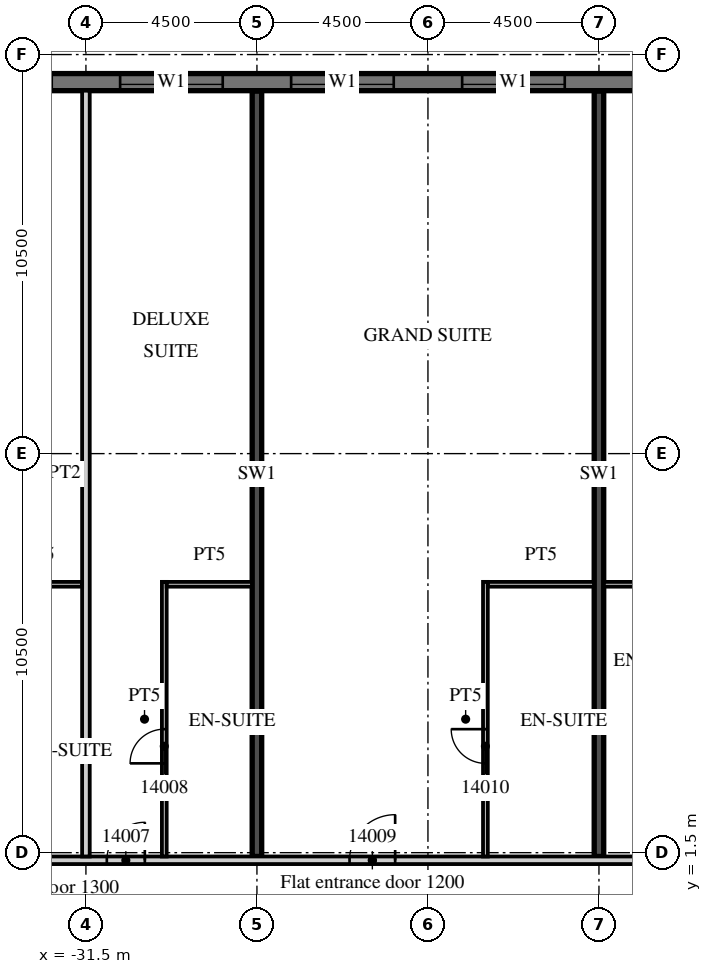
"""IFC4 building model, lengths in metres.
Left out: names, types, materials, properties, quantities, classifications, styles, units other than length and angle.
Written with IfcOpenShell. Run it as: python <this file> out.ifc"""

import sys

from ifc_helpers import new_model, si_unit, direction, frame, frame_2d, origin, place, context, subcontext, project, spatial, rectangle, extrude, element, fill, save


model = new_model("IFC4")
c1 = context("Model", 3, precision=1e-05, world=origin(), true_north=direction((0.0, 1.0)))
c2 = subcontext(c1, "Body", "Model", "MODEL_VIEW")
j1 = project(units=[si_unit("LENGTHUNIT", "METRE"), si_unit("PLANEANGLEUNIT", "RADIAN")], contexts=[c1])
p1 = place(None, origin())
s1 = spatial("IfcSite", under=j1, at=p1, CompositionType="ELEMENT")
p2 = place(p1, origin())
s2 = spatial("IfcBuilding", under=s1, at=p2, CompositionType="ELEMENT")
p3 = place(p2, frame((0.0, 0.0, 76.5)))
s3 = spatial("IfcBuildingStorey", under=s2, at=p3, CompositionType="ELEMENT", Elevation=76.5)
for number, where, z_axis, x_axis in (
    (1, (-27.0, 1.4, 0.0), (0.0, 0.0, 1.0), (0.0, 1.0, 0.0)),
    (2, (-18.0, 1.4, 0.0), (0.0, 0.0, 1.0), (0.0, 1.0, 0.0)),
):
    element("IfcWall", number, at=place(p3, frame(where, z_axis=z_axis, x_axis=x_axis)), inside=s3, PredefinedType="SHEAR", context=c2, shape_type="SweptSolid", body=[
        extrude(rectangle(XDim=20.14, YDim=0.25, at=frame_2d((10.07, 0.0))), origin(), (0.0, 0.0, 1.0), 3.3),
    ])
p4 = place(p3, frame((13.5, 21.775, 0.0), z_axis=(0.0, 0.0, 1.0), x_axis=(-1.0, 0.0, 0.0)))
e3 = element("IfcWall", 3, at=p4, inside=s3, PredefinedType="SOLIDWALL", context=c2, shape_type="SweptSolid", body=[
    extrude(rectangle(XDim=54.5, YDim=0.45, at=frame_2d((27.25, 0.0))), origin(), (0.0, 0.0, 1.0), 3.02),
])
p5 = place(p4, frame((0.9, 0.0, 0.45)))
e4 = element("IfcOpeningElement", 4, at=p5, cuts=e3, PredefinedType="OPENING", context=c2, shape_type="SweptSolid", body=[
    extrude(rectangle(XDim=2.7, YDim=2.25, at=frame_2d((1.35, 1.125))), frame((0.0, 0.235, 0.0), z_axis=(0.0, -1.0, 0.0), x_axis=(1.0, 0.0, 0.0)), (0.0, 0.0, 1.0), 0.47),
])
p6 = place(p4, frame((5.4, 0.0, 0.45)))
e5 = element("IfcOpeningElement", 5, at=p6, cuts=e3, PredefinedType="OPENING", context=c2, shape_type="SweptSolid", body=[
    extrude(rectangle(XDim=2.7, YDim=2.25, at=frame_2d((1.35, 1.125))), frame((0.0, 0.235, 0.0), z_axis=(0.0, -1.0, 0.0), x_axis=(1.0, 0.0, 0.0)), (0.0, 0.0, 1.0), 0.47),
])
p7 = place(p4, frame((9.9, 0.0, 0.45)))
e6 = element("IfcOpeningElement", 6, at=p7, cuts=e3, PredefinedType="OPENING", context=c2, shape_type="SweptSolid", body=[
    extrude(rectangle(XDim=2.7, YDim=2.25, at=frame_2d((1.35, 1.125))), frame((0.0, 0.235, 0.0), z_axis=(0.0, -1.0, 0.0), x_axis=(1.0, 0.0, 0.0)), (0.0, 0.0, 1.0), 0.47),
])
p8 = place(p4, frame((14.4, 0.0, 0.45)))
e7 = element("IfcOpeningElement", 7, at=p8, cuts=e3, PredefinedType="OPENING", context=c2, shape_type="SweptSolid", body=[
    extrude(rectangle(XDim=2.7, YDim=2.25, at=frame_2d((1.35, 1.125))), frame((0.0, 0.235, 0.0), z_axis=(0.0, -1.0, 0.0), x_axis=(1.0, 0.0, 0.0)), (0.0, 0.0, 1.0), 0.47),
])
p9 = place(p4, frame((18.9, 0.0, 0.45)))
e8 = element("IfcOpeningElement", 8, at=p9, cuts=e3, PredefinedType="OPENING", context=c2, shape_type="SweptSolid", body=[
    extrude(rectangle(XDim=2.7, YDim=2.25, at=frame_2d((1.35, 1.125))), frame((0.0, 0.235, 0.0), z_axis=(0.0, -1.0, 0.0), x_axis=(1.0, 0.0, 0.0)), (0.0, 0.0, 1.0), 0.47),
])
p10 = place(p4, frame((23.4, 0.0, 0.45)))
e9 = element("IfcOpeningElement", 9, at=p10, cuts=e3, PredefinedType="OPENING", context=c2, shape_type="SweptSolid", body=[
    extrude(rectangle(XDim=2.7, YDim=2.25, at=frame_2d((1.35, 1.125))), frame((0.0, 0.235, 0.0), z_axis=(0.0, -1.0, 0.0), x_axis=(1.0, 0.0, 0.0)), (0.0, 0.0, 1.0), 0.47),
])
p11 = place(p4, frame((27.9, 0.0, 0.45)))
e10 = element("IfcOpeningElement", 10, at=p11, cuts=e3, PredefinedType="OPENING", context=c2, shape_type="SweptSolid", body=[
    extrude(rectangle(XDim=2.7, YDim=2.25, at=frame_2d((1.35, 1.125))), frame((0.0, 0.235, 0.0), z_axis=(0.0, -1.0, 0.0), x_axis=(1.0, 0.0, 0.0)), (0.0, 0.0, 1.0), 0.47),
])
p12 = place(p4, frame((32.4, 0.0, 0.45)))
e11 = element("IfcOpeningElement", 11, at=p12, cuts=e3, PredefinedType="OPENING", context=c2, shape_type="SweptSolid", body=[
    extrude(rectangle(XDim=2.7, YDim=2.25, at=frame_2d((1.35, 1.125))), frame((0.0, 0.235, 0.0), z_axis=(0.0, -1.0, 0.0), x_axis=(1.0, 0.0, 0.0)), (0.0, 0.0, 1.0), 0.47),
])
p13 = place(p4, frame((36.9, 0.0, 0.45)))
e12 = element("IfcOpeningElement", 12, at=p13, cuts=e3, PredefinedType="OPENING", context=c2, shape_type="SweptSolid", body=[
    extrude(rectangle(XDim=2.7, YDim=2.25, at=frame_2d((1.35, 1.125))), frame((0.0, 0.235, 0.0), z_axis=(0.0, -1.0, 0.0), x_axis=(1.0, 0.0, 0.0)), (0.0, 0.0, 1.0), 0.47),
])
p14 = place(p4, frame((41.4, 0.0, 0.45)))
e13 = element("IfcOpeningElement", 13, at=p14, cuts=e3, PredefinedType="OPENING", context=c2, shape_type="SweptSolid", body=[
    extrude(rectangle(XDim=2.7, YDim=2.25, at=frame_2d((1.35, 1.125))), frame((0.0, 0.235, 0.0), z_axis=(0.0, -1.0, 0.0), x_axis=(1.0, 0.0, 0.0)), (0.0, 0.0, 1.0), 0.47),
])
p15 = place(p4, frame((45.9, 0.0, 0.45)))
e14 = element("IfcOpeningElement", 14, at=p15, cuts=e3, PredefinedType="OPENING", context=c2, shape_type="SweptSolid", body=[
    extrude(rectangle(XDim=2.7, YDim=2.25, at=frame_2d((1.35, 1.125))), frame((0.0, 0.235, 0.0), z_axis=(0.0, -1.0, 0.0), x_axis=(1.0, 0.0, 0.0)), (0.0, 0.0, 1.0), 0.47),
])
p16 = place(p4, frame((50.4, 0.0, 0.45)))
e15 = element("IfcOpeningElement", 15, at=p16, cuts=e3, PredefinedType="OPENING", context=c2, shape_type="SweptSolid", body=[
    extrude(rectangle(XDim=2.7, YDim=2.25, at=frame_2d((1.35, 1.125))), frame((0.0, 0.235, 0.0), z_axis=(0.0, -1.0, 0.0), x_axis=(1.0, 0.0, 0.0)), (0.0, 0.0, 1.0), 0.47),
])
p17 = place(p3, frame((-44.55, 1.3, 0.0), z_axis=(0.0, 0.0, 1.0), x_axis=(1.0, 0.0, 0.0)))
e16 = element("IfcWall", 16, at=p17, inside=s3, PredefinedType="PARTITIONING", context=c2, shape_type="SweptSolid", body=[
    extrude(rectangle(XDim=58.05, YDim=0.2, at=frame_2d((29.025, 0.0))), origin(), (0.0, 0.0, 1.0), 3.02),
])
p18 = place(p17, frame((0.525, 0.0, 0.0)))
e17 = element("IfcOpeningElement", 17, at=p18, cuts=e16, PredefinedType="OPENING", context=c2, shape_type="SweptSolid", body=[
    extrude(rectangle(XDim=1.0, YDim=2.1, at=frame_2d((0.5, 1.05))), frame((0.0, 0.11, 0.0), z_axis=(0.0, -1.0, 0.0), x_axis=(1.0, 0.0, 0.0)), (0.0, 0.0, 1.0), 0.22),
])
p19 = place(p17, frame((6.975, 0.0, 0.0)))
e18 = element("IfcOpeningElement", 18, at=p19, cuts=e16, PredefinedType="OPENING", context=c2, shape_type="SweptSolid", body=[
    extrude(rectangle(XDim=1.0, YDim=2.1, at=frame_2d((0.5, 1.05))), frame((0.0, 0.11, 0.0), z_axis=(0.0, -1.0, 0.0), x_axis=(1.0, 0.0, 0.0)), (0.0, 0.0, 1.0), 0.22),
])
p20 = place(p17, frame((9.125, 0.0, 0.0)))
e19 = element("IfcOpeningElement", 19, at=p20, cuts=e16, PredefinedType="OPENING", context=c2, shape_type="SweptSolid", body=[
    extrude(rectangle(XDim=1.0, YDim=2.1, at=frame_2d((0.5, 1.05))), frame((0.0, 0.11, 0.0), z_axis=(0.0, -1.0, 0.0), x_axis=(1.0, 0.0, 0.0)), (0.0, 0.0, 1.0), 0.22),
])
p21 = place(p17, frame((13.6, 0.0, 0.0)))
e20 = element("IfcOpeningElement", 20, at=p21, cuts=e16, PredefinedType="OPENING", context=c2, shape_type="SweptSolid", body=[
    extrude(rectangle(XDim=1.0, YDim=2.1, at=frame_2d((0.5, 1.05))), frame((0.0, 0.11, 0.0), z_axis=(0.0, -1.0, 0.0), x_axis=(1.0, 0.0, 0.0)), (0.0, 0.0, 1.0), 0.22),
])
p22 = place(p17, frame((19.987, 0.0, 0.0)))
e21 = element("IfcOpeningElement", 21, at=p22, cuts=e16, PredefinedType="OPENING", context=c2, shape_type="SweptSolid", body=[
    extrude(rectangle(XDim=1.2, YDim=2.1, at=frame_2d((0.6, 1.05))), frame((0.0, 0.11, 0.0), z_axis=(0.0, -1.0, 0.0), x_axis=(1.0, 0.0, 0.0)), (0.0, 0.0, 1.0), 0.22),
])
p23 = place(p17, frame((31.912, 0.0, 0.0)))
e22 = element("IfcOpeningElement", 22, at=p23, cuts=e16, PredefinedType="OPENING", context=c2, shape_type="SweptSolid", body=[
    extrude(rectangle(XDim=1.2, YDim=2.1, at=frame_2d((0.6, 1.05))), frame((0.0, 0.11, 0.0), z_axis=(0.0, -1.0, 0.0), x_axis=(1.0, 0.0, 0.0)), (0.0, 0.0, 1.0), 0.22),
])
p24 = place(p17, frame((38.5, 0.0, 0.0)))
e23 = element("IfcOpeningElement", 23, at=p24, cuts=e16, PredefinedType="OPENING", context=c2, shape_type="SweptSolid", body=[
    extrude(rectangle(XDim=1.0, YDim=2.1, at=frame_2d((0.5, 1.05))), frame((0.0, 0.11, 0.0), z_axis=(0.0, -1.0, 0.0), x_axis=(1.0, 0.0, 0.0)), (0.0, 0.0, 1.0), 0.22),
])
p25 = place(p17, frame((40.6, 0.0, 0.0)))
e24 = element("IfcOpeningElement", 24, at=p25, cuts=e16, PredefinedType="OPENING", context=c2, shape_type="SweptSolid", body=[
    extrude(rectangle(XDim=1.0, YDim=2.1, at=frame_2d((0.5, 1.05))), frame((0.0, 0.11, 0.0), z_axis=(0.0, -1.0, 0.0), x_axis=(1.0, 0.0, 0.0)), (0.0, 0.0, 1.0), 0.22),
])
p26 = place(p17, frame((47.5, 0.0, 0.0)))
e25 = element("IfcOpeningElement", 25, at=p26, cuts=e16, PredefinedType="OPENING", context=c2, shape_type="SweptSolid", body=[
    extrude(rectangle(XDim=1.0, YDim=2.1, at=frame_2d((0.5, 1.05))), frame((0.0, 0.11, 0.0), z_axis=(0.0, -1.0, 0.0), x_axis=(1.0, 0.0, 0.0)), (0.0, 0.0, 1.0), 0.22),
])
p27 = place(p17, frame((51.975, 0.0, 0.0)))
e26 = element("IfcOpeningElement", 26, at=p27, cuts=e16, PredefinedType="OPENING", context=c2, shape_type="SweptSolid", body=[
    extrude(rectangle(XDim=1.0, YDim=2.1, at=frame_2d((0.5, 1.05))), frame((0.0, 0.11, 0.0), z_axis=(0.0, -1.0, 0.0), x_axis=(1.0, 0.0, 0.0)), (0.0, 0.0, 1.0), 0.22),
])
p28 = place(p17, frame((56.475, 0.0, 0.0)))
e27 = element("IfcOpeningElement", 27, at=p28, cuts=e16, PredefinedType="OPENING", context=c2, shape_type="SweptSolid", body=[
    extrude(rectangle(XDim=1.0, YDim=2.1, at=frame_2d((0.5, 1.05))), frame((0.0, 0.11, 0.0), z_axis=(0.0, -1.0, 0.0), x_axis=(1.0, 0.0, 0.0)), (0.0, 0.0, 1.0), 0.22),
])
p29 = place(p3, frame((-31.5, 1.4, 0.0), z_axis=(0.0, 0.0, 1.0), x_axis=(0.0, 1.0, 0.0)))
e28 = element("IfcWall", 28, at=p29, inside=s3, PredefinedType="PARTITIONING", context=c2, shape_type="SweptSolid", body=[
    extrude(rectangle(XDim=20.15, YDim=0.2, at=frame_2d((10.075, 0.0))), origin(), (0.0, 0.0, 1.0), 3.02),
])
p30 = place(p3, frame((-33.85, 8.562, 0.0), z_axis=(0.0, 0.0, 1.0), x_axis=(1.0, 0.0, 0.0)))
e29 = element("IfcWall", 29, at=p30, inside=s3, PredefinedType="PARTITIONING", context=c2, shape_type="SweptSolid", body=[
    extrude(rectangle(XDim=2.25, YDim=0.125, at=frame_2d((1.125, 0.0))), origin(), (0.0, 0.0, 1.0), 3.02),
])
p31 = place(p3, frame((-29.438, 1.4, 0.0), z_axis=(0.0, 0.0, 1.0), x_axis=(0.0, 1.0, 0.0)))
e30 = element("IfcWall", 30, at=p31, inside=s3, PredefinedType="PARTITIONING", context=c2, shape_type="SweptSolid", body=[
    extrude(rectangle(XDim=7.225, YDim=0.125, at=frame_2d((3.613, 0.0))), origin(), (0.0, 0.0, 1.0), 3.02),
])
p32 = place(p31, frame((2.45, 0.0, 0.0)))
e31 = element("IfcOpeningElement", 31, at=p32, cuts=e30, PredefinedType="OPENING", context=c2, shape_type="SweptSolid", body=[
    extrude(rectangle(XDim=0.9, YDim=2.1, at=frame_2d((0.45, 1.05))), frame((0.0, 0.073, 0.0), z_axis=(0.0, -1.0, 0.0), x_axis=(1.0, 0.0, 0.0)), (0.0, 0.0, 1.0), 0.145),
])
p33 = place(p3, frame((-29.375, 8.562, 0.0), z_axis=(0.0, 0.0, 1.0), x_axis=(1.0, 0.0, 0.0)))
e32 = element("IfcWall", 32, at=p33, inside=s3, PredefinedType="PARTITIONING", context=c2, shape_type="SweptSolid", body=[
    extrude(rectangle(XDim=2.25, YDim=0.125, at=frame_2d((1.125, 0.0))), origin(), (0.0, 0.0, 1.0), 3.02),
])
p34 = place(p3, frame((-20.988, 1.4, 0.0), z_axis=(0.0, 0.0, 1.0), x_axis=(0.0, 1.0, 0.0)))
e33 = element("IfcWall", 33, at=p34, inside=s3, PredefinedType="PARTITIONING", context=c2, shape_type="SweptSolid", body=[
    extrude(rectangle(XDim=7.225, YDim=0.125, at=frame_2d((3.613, 0.0))), origin(), (0.0, 0.0, 1.0), 3.02),
])
p35 = place(p34, frame((2.45, 0.0, 0.0)))
e34 = element("IfcOpeningElement", 34, at=p35, cuts=e33, PredefinedType="OPENING", context=c2, shape_type="SweptSolid", body=[
    extrude(rectangle(XDim=0.9, YDim=2.1, at=frame_2d((0.45, 1.05))), frame((0.0, 0.073, 0.0), z_axis=(0.0, -1.0, 0.0), x_axis=(1.0, 0.0, 0.0)), (0.0, 0.0, 1.0), 0.145),
])
for number, where, z_axis, x_axis in (
    (35, (-20.925, 8.562, 0.0), (0.0, 0.0, 1.0), (1.0, 0.0, 0.0)),
    (36, (-17.875, 8.562, 0.0), (0.0, 0.0, 1.0), (1.0, 0.0, 0.0)),
):
    element("IfcWall", number, at=place(p3, frame(where, z_axis=z_axis, x_axis=x_axis)), inside=s3, PredefinedType="PARTITIONING", context=c2, shape_type="SweptSolid", body=[
        extrude(rectangle(XDim=2.8, YDim=0.125, at=frame_2d((1.4, 0.0))), origin(), (0.0, 0.0, 1.0), 3.02),
    ])
p36 = place(p12, origin())
e37 = element("IfcWindow", 37, at=p36, inside=s3, PartitioningType="SINGLE_PANEL", PredefinedType="WINDOW", context=c2, shape_type="SweptSolid", body=[
    extrude(rectangle(XDim=2.7, YDim=2.25, at=frame_2d((1.35, 1.125))), frame((0.0, 0.09, 0.0), z_axis=(0.0, -1.0, 0.0), x_axis=(1.0, 0.0, 0.0)), (0.0, 0.0, 1.0), 0.06),
])
fill(e11, e37)
p37 = place(p13, origin())
e38 = element("IfcWindow", 38, at=p37, inside=s3, PartitioningType="SINGLE_PANEL", PredefinedType="WINDOW", context=c2, shape_type="SweptSolid", body=[
    extrude(rectangle(XDim=2.7, YDim=2.25, at=frame_2d((1.35, 1.125))), frame((0.0, 0.09, 0.0), z_axis=(0.0, -1.0, 0.0), x_axis=(1.0, 0.0, 0.0)), (0.0, 0.0, 1.0), 0.06),
])
fill(e12, e38)
p38 = place(p14, origin())
e39 = element("IfcWindow", 39, at=p38, inside=s3, PartitioningType="SINGLE_PANEL", PredefinedType="WINDOW", context=c2, shape_type="SweptSolid", body=[
    extrude(rectangle(XDim=2.7, YDim=2.25, at=frame_2d((1.35, 1.125))), frame((0.0, 0.09, 0.0), z_axis=(0.0, -1.0, 0.0), x_axis=(1.0, 0.0, 0.0)), (0.0, 0.0, 1.0), 0.06),
])
fill(e13, e39)
p39 = place(p21, origin())
e40 = element("IfcDoor", 40, at=p39, inside=s3, OperationType="SINGLE_SWING_RIGHT", PredefinedType="DOOR", context=c2, shape_type="SweptSolid", body=[
    extrude(rectangle(XDim=1.0, YDim=2.1, at=frame_2d((0.5, 1.05))), frame((0.0, 0.025, 0.0), z_axis=(0.0, -1.0, 0.0), x_axis=(1.0, 0.0, 0.0)), (0.0, 0.0, 1.0), 0.05),
])
fill(e20, e40)
p40 = place(p32, origin())
e41 = element("IfcDoor", 41, at=p40, inside=s3, OperationType="SINGLE_SWING_LEFT", PredefinedType="DOOR", context=c2, shape_type="SweptSolid", body=[
    extrude(rectangle(XDim=0.9, YDim=2.1, at=frame_2d((0.45, 1.05))), frame((0.0, 0.025, 0.0), z_axis=(0.0, -1.0, 0.0), x_axis=(1.0, 0.0, 0.0)), (0.0, 0.0, 1.0), 0.05),
])
fill(e31, e41)
p41 = place(p22, origin())
e42 = element("IfcDoor", 42, at=p41, inside=s3, OperationType="SINGLE_SWING_RIGHT", PredefinedType="DOOR", context=c2, shape_type="SweptSolid", body=[
    extrude(rectangle(XDim=1.2, YDim=2.1, at=frame_2d((0.6, 1.05))), frame((0.0, 0.025, 0.0), z_axis=(0.0, -1.0, 0.0), x_axis=(1.0, 0.0, 0.0)), (0.0, 0.0, 1.0), 0.05),
])
fill(e21, e42)
p42 = place(p35, origin())
e43 = element("IfcDoor", 43, at=p42, inside=s3, OperationType="SINGLE_SWING_RIGHT", PredefinedType="DOOR", context=c2, shape_type="SweptSolid", body=[
    extrude(rectangle(XDim=0.9, YDim=2.1, at=frame_2d((0.45, 1.05))), frame((0.0, 0.025, 0.0), z_axis=(0.0, -1.0, 0.0), x_axis=(1.0, 0.0, 0.0)), (0.0, 0.0, 1.0), 0.05),
])
fill(e34, e43)
save(model, sys.argv[1])
